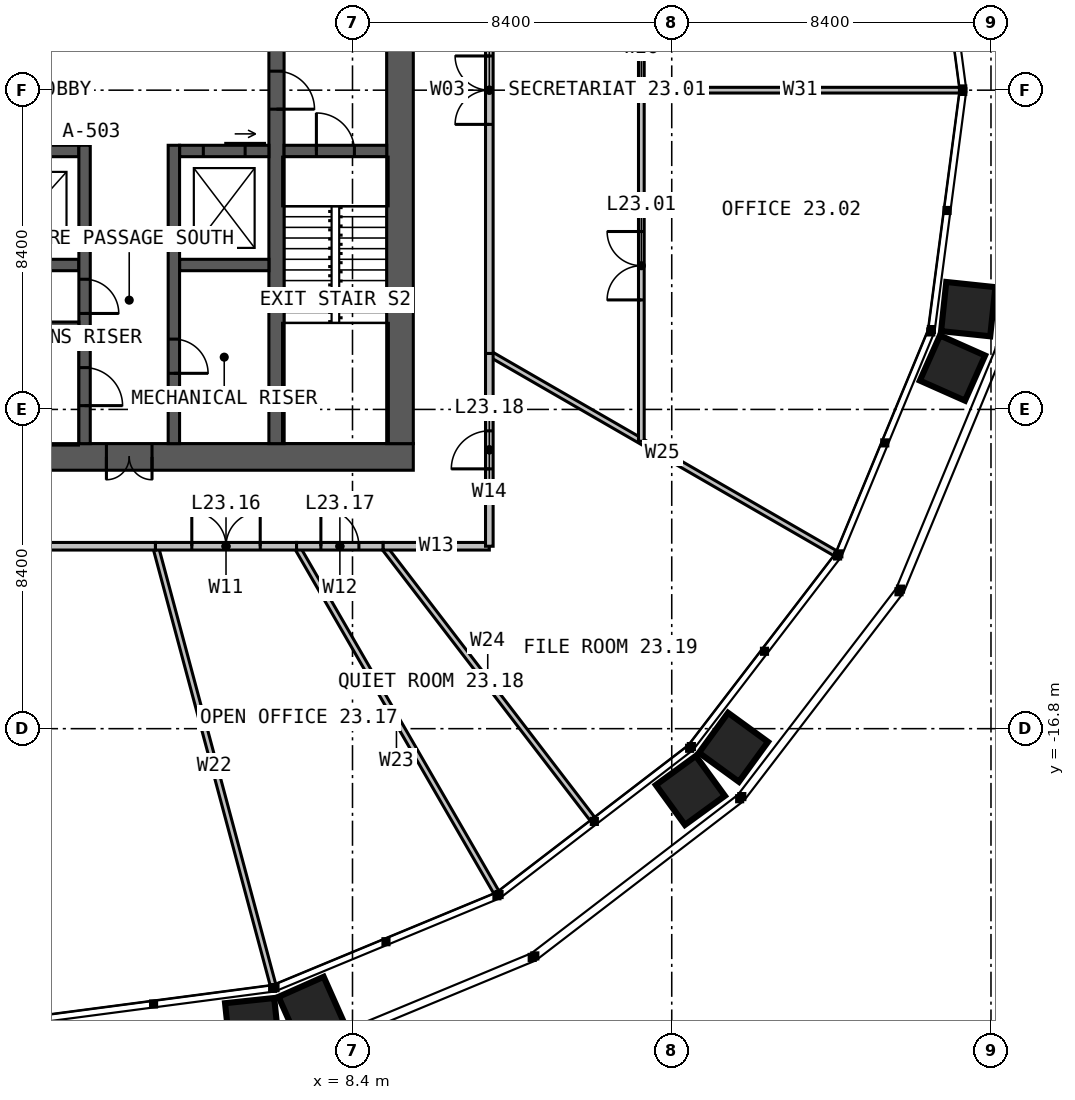
"""IFC4 building model, lengths in metres.
Left out: names, types, materials, properties, quantities, classifications, styles, units other than length and angle.
Written with IfcOpenShell. Run it as: python <this file> out.ifc"""

import sys

from ifc_helpers import new_model, si_unit, direction, frame, frame_2d, origin, place, context, subcontext, project, spatial, rectangle, extrude, element, fill, save


model = new_model("IFC4")
c1 = context("Model", 3, precision=1e-05, world=origin(), true_north=direction((0.0, 1.0)))
c2 = subcontext(c1, "Body", "Model", "MODEL_VIEW")
j1 = project(units=[si_unit("LENGTHUNIT", "METRE"), si_unit("PLANEANGLEUNIT", "RADIAN")], contexts=[c1])
p1 = place(None, origin())
s1 = spatial("IfcSite", under=j1, at=p1, CompositionType="ELEMENT")
p2 = place(p1, origin())
s2 = spatial("IfcBuilding", under=s1, at=p2, CompositionType="ELEMENT")
p3 = place(p2, frame((0.0, 0.0, 98.0)))
s3 = spatial("IfcBuildingStorey", under=s2, at=p3, CompositionType="ELEMENT", Elevation=98.0)
p4 = place(p3, frame((10.0, -9.65, 0.0), z_axis=(0.0, 0.0, 1.0), x_axis=(-1.0, 0.0, 0.0)))
e1 = element("IfcWall", 1, at=p4, inside=s3, PredefinedType="SOLIDWALL", context=c2, shape_type="SweptSolid", body=[
    extrude(rectangle(XDim=20.0, YDim=0.7, at=frame_2d((10.0, 0.0))), origin(), (0.0, 0.0, 1.0), 4.0),
])
p5 = place(p4, frame((6.875, 0.0, 0.0)))
e2 = element("IfcOpeningElement", 2, at=p5, cuts=e1, PredefinedType="OPENING", context=c2, shape_type="SweptSolid", body=[
    extrude(rectangle(XDim=1.2, YDim=2.2, at=frame_2d((0.6, 1.1))), frame((0.0, 0.36, 0.0), z_axis=(0.0, -1.0, 0.0), x_axis=(1.0, 0.0, 0.0)), (0.0, 0.0, 1.0), 0.72),
])
p6 = place(p3, frame((9.65, -9.3, 0.0), z_axis=(0.0, 0.0, 1.0), x_axis=(0.0, 1.0, 0.0)))
e3 = element("IfcWall", 3, at=p6, inside=s3, PredefinedType="SOLIDWALL", context=c2, shape_type="SweptSolid", body=[
    extrude(rectangle(XDim=18.6, YDim=0.7, at=frame_2d((9.3, 0.0))), origin(), (0.0, 0.0, 1.0), 4.0),
])
p7 = place(p3, frame((6.4, 9.3, 0.0), z_axis=(0.0, 0.0, 1.0), x_axis=(0.0, -1.0, 0.0)))
e4 = element("IfcWall", 4, at=p7, inside=s3, PredefinedType="SOLIDWALL", context=c2, shape_type="SweptSolid", body=[
    extrude(rectangle(XDim=18.6, YDim=0.4, at=frame_2d((9.3, 0.0))), origin(), (0.0, 0.0, 1.0), 4.0),
])
p8 = place(p7, frame((8.8, 0.0, 0.0)))
e5 = element("IfcOpeningElement", 5, at=p8, cuts=e4, PredefinedType="OPENING", context=c2, shape_type="SweptSolid", body=[
    extrude(rectangle(XDim=1.0, YDim=2.2, at=frame_2d((0.5, 1.1))), frame((0.0, 0.21, 0.0), z_axis=(0.0, -1.0, 0.0), x_axis=(1.0, 0.0, 0.0)), (0.0, 0.0, 1.0), 0.42),
])
p9 = place(p3, frame((-6.2, -1.6, 0.0), z_axis=(0.0, 0.0, 1.0), x_axis=(1.0, 0.0, 0.0)))
e6 = element("IfcWall", 6, at=p9, inside=s3, PredefinedType="SOLIDWALL", context=c2, shape_type="SweptSolid", body=[
    extrude(rectangle(XDim=7.4, YDim=0.3, at=frame_2d((3.7, 0.0))), origin(), (0.0, 0.0, 1.0), 4.0),
])
p10 = place(p3, frame((3.85, -1.6, 0.0), z_axis=(0.0, 0.0, 1.0), x_axis=(1.0, 0.0, 0.0)))
e7 = element("IfcWall", 7, at=p10, inside=s3, PredefinedType="SOLIDWALL", context=c2, shape_type="SweptSolid", body=[
    extrude(rectangle(XDim=2.35, YDim=0.3, at=frame_2d((1.175, 0.0))), origin(), (0.0, 0.0, 1.0), 4.0),
])
p11 = place(p10, frame((0.625, 0.0, 0.0)))
e8 = element("IfcOpeningElement", 8, at=p11, cuts=e7, PredefinedType="OPENING", context=c2, shape_type="SweptSolid", body=[
    extrude(rectangle(XDim=1.1, YDim=2.2, at=frame_2d((0.55, 1.1))), frame((0.0, 0.16, 0.0), z_axis=(0.0, -1.0, 0.0), x_axis=(1.0, 0.0, 0.0)), (0.0, 0.0, 1.0), 0.32),
])
p12 = place(p3, frame((-6.2, -4.6, 0.0), z_axis=(0.0, 0.0, 1.0), x_axis=(1.0, 0.0, 0.0)))
e9 = element("IfcWall", 9, at=p12, inside=s3, PredefinedType="SOLIDWALL", context=c2, shape_type="SweptSolid", body=[
    extrude(rectangle(XDim=7.4, YDim=0.3, at=frame_2d((3.7, 0.0))), origin(), (0.0, 0.0, 1.0), 4.0),
])
p13 = place(p3, frame((3.85, -4.6, 0.0), z_axis=(0.0, 0.0, 1.0), x_axis=(1.0, 0.0, 0.0)))
e10 = element("IfcWall", 10, at=p13, inside=s3, PredefinedType="SOLIDWALL", context=c2, shape_type="SweptSolid", body=[
    extrude(rectangle(XDim=2.35, YDim=0.3, at=frame_2d((1.175, 0.0))), origin(), (0.0, 0.0, 1.0), 4.0),
])
p14 = place(p3, frame((1.35, -1.45, 0.0), z_axis=(0.0, 0.0, 1.0), x_axis=(0.0, -1.0, 0.0)))
e11 = element("IfcWall", 11, at=p14, inside=s3, PredefinedType="SOLIDWALL", context=c2, shape_type="SweptSolid", body=[
    extrude(rectangle(XDim=7.85, YDim=0.3, at=frame_2d((3.925, 0.0))), origin(), (0.0, 0.0, 1.0), 4.0),
])
p15 = place(p14, frame((5.85, 0.0, 0.0)))
e12 = element("IfcOpeningElement", 12, at=p15, cuts=e11, PredefinedType="OPENING", context=c2, shape_type="SweptSolid", body=[
    extrude(rectangle(XDim=1.0, YDim=2.2, at=frame_2d((0.5, 1.1))), frame((0.0, 0.16, 0.0), z_axis=(0.0, -1.0, 0.0), x_axis=(1.0, 0.0, 0.0)), (0.0, 0.0, 1.0), 0.32),
])
p16 = place(p14, frame((3.525, 0.0, 0.0)))
e13 = element("IfcOpeningElement", 13, at=p16, cuts=e11, PredefinedType="OPENING", context=c2, shape_type="SweptSolid", body=[
    extrude(rectangle(XDim=0.9, YDim=2.2, at=frame_2d((0.45, 1.1))), frame((0.0, 0.16, 0.0), z_axis=(0.0, -1.0, 0.0), x_axis=(1.0, 0.0, 0.0)), (0.0, 0.0, 1.0), 0.32),
])
p17 = place(p3, frame((3.7, -1.45, 0.0), z_axis=(0.0, 0.0, 1.0), x_axis=(0.0, -1.0, 0.0)))
e14 = element("IfcWall", 14, at=p17, inside=s3, PredefinedType="SOLIDWALL", context=c2, shape_type="SweptSolid", body=[
    extrude(rectangle(XDim=7.85, YDim=0.3, at=frame_2d((3.925, 0.0))), origin(), (0.0, 0.0, 1.0), 4.0),
])
p18 = place(p17, frame((5.1, 0.0, 0.0)))
e15 = element("IfcOpeningElement", 15, at=p18, cuts=e14, PredefinedType="OPENING", context=c2, shape_type="SweptSolid", body=[
    extrude(rectangle(XDim=0.9, YDim=2.2, at=frame_2d((0.45, 1.1))), frame((0.0, 0.16, 0.0), z_axis=(0.0, -1.0, 0.0), x_axis=(1.0, 0.0, 0.0)), (0.0, 0.0, 1.0), 0.32),
])
p19 = place(p3, frame((-6.2, -6.2, 0.0), z_axis=(0.0, 0.0, 1.0), x_axis=(1.0, 0.0, 0.0)))
e16 = element("IfcWall", 16, at=p19, inside=s3, PredefinedType="SOLIDWALL", context=c2, shape_type="SweptSolid", body=[
    extrude(rectangle(XDim=7.4, YDim=0.2, at=frame_2d((3.7, 0.0))), origin(), (0.0, 0.0, 1.0), 4.0),
])
p20 = place(p3, frame((6.6, -1.6, 0.0), z_axis=(0.0, 0.0, 1.0), x_axis=(1.0, 0.0, 0.0)))
e17 = element("IfcWall", 17, at=p20, inside=s3, PredefinedType="SOLIDWALL", context=c2, shape_type="SweptSolid", body=[
    extrude(rectangle(XDim=2.7, YDim=0.3, at=frame_2d((1.35, 0.0))), origin(), (0.0, 0.0, 1.0), 4.0),
])
p21 = place(p20, frame((0.85, 0.0, 0.0)))
e18 = element("IfcOpeningElement", 18, at=p21, cuts=e17, PredefinedType="OPENING", context=c2, shape_type="SweptSolid", body=[
    extrude(rectangle(XDim=1.0, YDim=2.2, at=frame_2d((0.5, 1.1))), frame((0.0, 0.16, 0.0), z_axis=(0.0, -1.0, 0.0), x_axis=(1.0, 0.0, 0.0)), (0.0, 0.0, 1.0), 0.32),
])
p22 = place(p3, frame((12.0, -6.928, 0.0), z_axis=(0.0, 0.0, 1.0), x_axis=(0.866028201971, -0.499995153367, 0.0)))
e19 = element("IfcWall", 19, at=p22, inside=s3, PredefinedType="PARTITIONING", context=c2, shape_type="SweptSolid", body=[
    extrude(rectangle(XDim=10.514, YDim=0.15, at=frame_2d((5.257, 0.0))), origin(), (0.0, 0.0, 1.0), 2.79),
])
p23 = place(p3, frame((3.215, -12.0, 0.0), z_axis=(0.0, 0.0, 1.0), x_axis=(0.258816099716, -0.965926615498, 0.0)))
e20 = element("IfcWall", 20, at=p23, inside=s3, PredefinedType="PARTITIONING", context=c2, shape_type="SweptSolid", body=[
    extrude(rectangle(XDim=11.947, YDim=0.15, at=frame_2d((5.973, 0.0))), origin(), (0.0, 0.0, 1.0), 2.79),
])
p24 = place(p3, frame((6.928, -12.0, 0.0), z_axis=(0.0, 0.0, 1.0), x_axis=(0.499995153367, -0.866028201971, 0.0)))
e21 = element("IfcWall", 21, at=p24, inside=s3, PredefinedType="PARTITIONING", context=c2, shape_type="SweptSolid", body=[
    extrude(rectangle(XDim=10.514, YDim=0.15, at=frame_2d((5.257, 0.0))), origin(), (0.0, 0.0, 1.0), 2.79),
])
p25 = place(p3, frame((9.208, -12.0, 0.0), z_axis=(0.0, 0.0, 1.0), x_axis=(0.60876104896, -0.793353631913, 0.0)))
e22 = element("IfcWall", 22, at=p25, inside=s3, PredefinedType="PARTITIONING", context=c2, shape_type="SweptSolid", body=[
    extrude(rectangle(XDim=9.036, YDim=0.15, at=frame_2d((4.518, 0.0))), origin(), (0.0, 0.0, 1.0), 2.79),
])
p26 = place(p3, frame((16.0, -9.238, 0.0), z_axis=(0.0, 0.0, 1.0), x_axis=(0.0, 1.0, 0.0)))
e23 = element("IfcWall", 23, at=p26, inside=s3, PredefinedType="PARTITIONING", context=c2, shape_type="SweptSolid", body=[
    extrude(rectangle(XDim=18.475, YDim=0.15, at=frame_2d((9.238, 0.0))), origin(), (0.0, 0.0, 1.0), 2.79),
])
p27 = place(p26, frame((3.719, 0.0, 0.0)))
e24 = element("IfcOpeningElement", 24, at=p27, cuts=e23, PredefinedType="OPENING", context=c2, shape_type="SweptSolid", body=[
    extrude(rectangle(XDim=1.8, YDim=2.2, at=frame_2d((0.9, 1.1))), frame((0.0, 0.085, 0.0), z_axis=(0.0, -1.0, 0.0), x_axis=(1.0, 0.0, 0.0)), (0.0, 0.0, 1.0), 0.17),
])
p28 = place(p26, frame((12.051, 0.0, 0.0)))
e25 = element("IfcOpeningElement", 25, at=p28, cuts=e23, PredefinedType="OPENING", context=c2, shape_type="SweptSolid", body=[
    extrude(rectangle(XDim=1.0, YDim=2.2, at=frame_2d((0.5, 1.1))), frame((0.0, 0.085, 0.0), z_axis=(0.0, -1.0, 0.0), x_axis=(1.0, 0.0, 0.0)), (0.0, 0.0, 1.0), 0.17),
])
p29 = place(p26, frame((16.67, 0.0, 0.0)))
e26 = element("IfcOpeningElement", 26, at=p29, cuts=e23, PredefinedType="OPENING", context=c2, shape_type="SweptSolid", body=[
    extrude(rectangle(XDim=1.0, YDim=2.2, at=frame_2d((0.5, 1.1))), frame((0.0, 0.085, 0.0), z_axis=(0.0, -1.0, 0.0), x_axis=(1.0, 0.0, 0.0)), (0.0, 0.0, 1.0), 0.17),
])
p30 = place(p3, frame((16.0, 0.0, 0.0), z_axis=(0.0, 0.0, 1.0), x_axis=(1.0, 0.0, 0.0)))
e27 = element("IfcWall", 27, at=p30, inside=s3, PredefinedType="PARTITIONING", context=c2, shape_type="SweptSolid", body=[
    extrude(rectangle(XDim=8.37, YDim=0.15, at=frame_2d((4.185, 0.0))), origin(), (0.0, 0.0, 1.0), 2.79),
])
p31 = place(p3, frame((12.0, -6.928, 0.0), z_axis=(0.0, 0.0, 1.0), x_axis=(0.0, 1.0, 0.0)))
e28 = element("IfcWall", 28, at=p31, inside=s3, PredefinedType="PARTITIONING", context=c2, shape_type="SweptSolid", body=[
    extrude(rectangle(XDim=13.856, YDim=0.2, at=frame_2d((6.928, 0.0))), origin(), (0.0, 0.0, 1.0), 3.8),
])
p32 = place(p31, frame((6.028, 0.0, 0.0)))
e29 = element("IfcOpeningElement", 29, at=p32, cuts=e28, PredefinedType="OPENING", context=c2, shape_type="SweptSolid", body=[
    extrude(rectangle(XDim=1.8, YDim=2.2, at=frame_2d((0.9, 1.1))), frame((0.0, 0.11, 0.0), z_axis=(0.0, -1.0, 0.0), x_axis=(1.0, 0.0, 0.0)), (0.0, 0.0, 1.0), 0.22),
])
p33 = place(p3, frame((-6.928, -12.0, 0.0), z_axis=(0.0, 0.0, 1.0), x_axis=(1.0, 0.0, 0.0)))
e30 = element("IfcWall", 30, at=p33, inside=s3, PredefinedType="PARTITIONING", context=c2, shape_type="SweptSolid", body=[
    extrude(rectangle(XDim=10.144, YDim=0.2, at=frame_2d((5.072, 0.0))), origin(), (0.0, 0.0, 1.0), 3.8),
])
p34 = place(p33, frame((4.172, 0.0, 0.0)))
e31 = element("IfcOpeningElement", 31, at=p34, cuts=e30, PredefinedType="OPENING", context=c2, shape_type="SweptSolid", body=[
    extrude(rectangle(XDim=1.8, YDim=2.2, at=frame_2d((0.9, 1.1))), frame((0.0, 0.11, 0.0), z_axis=(0.0, -1.0, 0.0), x_axis=(1.0, 0.0, 0.0)), (0.0, 0.0, 1.0), 0.22),
])
p35 = place(p3, frame((3.215, -12.0, 0.0), z_axis=(0.0, 0.0, 1.0), x_axis=(1.0, 0.0, 0.0)))
e32 = element("IfcWall", 32, at=p35, inside=s3, PredefinedType="PARTITIONING", context=c2, shape_type="SweptSolid", body=[
    extrude(rectangle(XDim=3.713, YDim=0.2, at=frame_2d((1.856, 0.0))), origin(), (0.0, 0.0, 1.0), 3.8),
])
p36 = place(p35, frame((0.956, 0.0, 0.0)))
e33 = element("IfcOpeningElement", 33, at=p36, cuts=e32, PredefinedType="OPENING", context=c2, shape_type="SweptSolid", body=[
    extrude(rectangle(XDim=1.8, YDim=2.2, at=frame_2d((0.9, 1.1))), frame((0.0, 0.11, 0.0), z_axis=(0.0, -1.0, 0.0), x_axis=(1.0, 0.0, 0.0)), (0.0, 0.0, 1.0), 0.22),
])
p37 = place(p3, frame((6.928, -12.0, 0.0), z_axis=(0.0, 0.0, 1.0), x_axis=(1.0, 0.0, 0.0)))
e34 = element("IfcWall", 34, at=p37, inside=s3, PredefinedType="PARTITIONING", context=c2, shape_type="SweptSolid", body=[
    extrude(rectangle(XDim=2.28, YDim=0.2, at=frame_2d((1.14, 0.0))), origin(), (0.0, 0.0, 1.0), 3.8),
])
p38 = place(p37, frame((0.64, 0.0, 0.0)))
e35 = element("IfcOpeningElement", 35, at=p38, cuts=e34, PredefinedType="OPENING", context=c2, shape_type="SweptSolid", body=[
    extrude(rectangle(XDim=1.0, YDim=2.2, at=frame_2d((0.5, 1.1))), frame((0.0, 0.11, 0.0), z_axis=(0.0, -1.0, 0.0), x_axis=(1.0, 0.0, 0.0)), (0.0, 0.0, 1.0), 0.22),
])
p39 = place(p3, frame((9.208, -12.0, 0.0), z_axis=(0.0, 0.0, 1.0), x_axis=(1.0, 0.0, 0.0)))
e36 = element("IfcWall", 36, at=p39, inside=s3, PredefinedType="PARTITIONING", context=c2, shape_type="SweptSolid", body=[
    extrude(rectangle(XDim=2.792, YDim=0.2, at=frame_2d((1.396, 0.0))), origin(), (0.0, 0.0, 1.0), 3.8),
])
p40 = place(p3, frame((12.0, -12.0, 0.0), z_axis=(0.0, 0.0, 1.0), x_axis=(0.0, 1.0, 0.0)))
e37 = element("IfcWall", 37, at=p40, inside=s3, PredefinedType="PARTITIONING", context=c2, shape_type="SweptSolid", body=[
    extrude(rectangle(XDim=5.072, YDim=0.2, at=frame_2d((2.536, 0.0))), origin(), (0.0, 0.0, 1.0), 3.8),
])
p41 = place(p40, frame((2.036, 0.0, 0.0)))
e38 = element("IfcOpeningElement", 38, at=p41, cuts=e37, PredefinedType="OPENING", context=c2, shape_type="SweptSolid", body=[
    extrude(rectangle(XDim=1.0, YDim=2.2, at=frame_2d((0.5, 1.1))), frame((0.0, 0.11, 0.0), z_axis=(0.0, -1.0, 0.0), x_axis=(1.0, 0.0, 0.0)), (0.0, 0.0, 1.0), 0.22),
])
p42 = place(p5, origin())
e39 = element("IfcDoor", 39, at=p42, inside=s3, OperationType="DOUBLE_DOOR_SINGLE_SWING", PredefinedType="DOOR", context=c2, shape_type="SweptSolid", body=[
    extrude(rectangle(XDim=1.2, YDim=2.2, at=frame_2d((0.6, 1.1))), frame((0.0, 0.025, 0.0), z_axis=(0.0, -1.0, 0.0), x_axis=(1.0, 0.0, 0.0)), (0.0, 0.0, 1.0), 0.05),
])
fill(e2, e39)
p43 = place(p8, origin())
e40 = element("IfcDoor", 40, at=p43, inside=s3, OperationType="SINGLE_SWING_RIGHT", PredefinedType="DOOR", context=c2, shape_type="SweptSolid", body=[
    extrude(rectangle(XDim=1.0, YDim=2.2, at=frame_2d((0.5, 1.1))), frame((0.0, 0.025, 0.0), z_axis=(0.0, -1.0, 0.0), x_axis=(1.0, 0.0, 0.0)), (0.0, 0.0, 1.0), 0.05),
])
fill(e5, e40)
p44 = place(p21, origin())
e41 = element("IfcDoor", 41, at=p44, inside=s3, OperationType="SINGLE_SWING_LEFT", PredefinedType="DOOR", context=c2, shape_type="SweptSolid", body=[
    extrude(rectangle(XDim=1.0, YDim=2.2, at=frame_2d((0.5, 1.1))), frame((0.0, 0.025, 0.0), z_axis=(0.0, -1.0, 0.0), x_axis=(1.0, 0.0, 0.0)), (0.0, 0.0, 1.0), 0.05),
])
fill(e18, e41)
p45 = place(p15, origin())
e42 = element("IfcDoor", 42, at=p45, inside=s3, OperationType="SINGLE_SWING_RIGHT", PredefinedType="DOOR", context=c2, shape_type="SweptSolid", body=[
    extrude(rectangle(XDim=1.0, YDim=2.2, at=frame_2d((0.5, 1.1))), frame((0.0, 0.025, 0.0), z_axis=(0.0, -1.0, 0.0), x_axis=(1.0, 0.0, 0.0)), (0.0, 0.0, 1.0), 0.05),
])
fill(e12, e42)
p46 = place(p16, origin())
e43 = element("IfcDoor", 43, at=p46, inside=s3, OperationType="SINGLE_SWING_RIGHT", PredefinedType="DOOR", context=c2, shape_type="SweptSolid", body=[
    extrude(rectangle(XDim=0.9, YDim=2.2, at=frame_2d((0.45, 1.1))), frame((0.0, 0.025, 0.0), z_axis=(0.0, -1.0, 0.0), x_axis=(1.0, 0.0, 0.0)), (0.0, 0.0, 1.0), 0.05),
])
fill(e13, e43)
p47 = place(p18, origin())
e44 = element("IfcDoor", 44, at=p47, inside=s3, OperationType="SINGLE_SWING_RIGHT", PredefinedType="DOOR", context=c2, shape_type="SweptSolid", body=[
    extrude(rectangle(XDim=0.9, YDim=2.2, at=frame_2d((0.45, 1.1))), frame((0.0, 0.025, 0.0), z_axis=(0.0, -1.0, 0.0), x_axis=(1.0, 0.0, 0.0)), (0.0, 0.0, 1.0), 0.05),
])
fill(e15, e44)
p48 = place(p11, origin())
e45 = element("IfcDoor", 45, at=p48, inside=s3, OperationType="SLIDING_TO_LEFT", PredefinedType="DOOR", context=c2, shape_type="SweptSolid", body=[
    extrude(rectangle(XDim=1.1, YDim=2.2, at=frame_2d((0.55, 1.1))), frame((0.0, 0.025, 0.0), z_axis=(0.0, -1.0, 0.0), x_axis=(1.0, 0.0, 0.0)), (0.0, 0.0, 1.0), 0.05),
])
fill(e8, e45)
p49 = place(p27, origin())
e46 = element("IfcDoor", 46, at=p49, inside=s3, OperationType="DOUBLE_DOOR_SINGLE_SWING", PredefinedType="DOOR", context=c2, shape_type="SweptSolid", body=[
    extrude(rectangle(XDim=1.8, YDim=2.2, at=frame_2d((0.9, 1.1))), frame((0.0, 0.025, 0.0), z_axis=(0.0, -1.0, 0.0), x_axis=(1.0, 0.0, 0.0)), (0.0, 0.0, 1.0), 0.05),
])
fill(e24, e46)
p50 = place(p32, origin())
e47 = element("IfcDoor", 47, at=p50, inside=s3, OperationType="DOUBLE_DOOR_SINGLE_SWING", PredefinedType="DOOR", context=c2, shape_type="SweptSolid", body=[
    extrude(rectangle(XDim=1.8, YDim=2.2, at=frame_2d((0.9, 1.1))), frame((0.0, 0.025, 0.0), z_axis=(0.0, -1.0, 0.0), x_axis=(1.0, 0.0, 0.0)), (0.0, 0.0, 1.0), 0.05),
])
fill(e29, e47)
p51 = place(p36, origin())
e48 = element("IfcDoor", 48, at=p51, inside=s3, OperationType="DOUBLE_DOOR_SINGLE_SWING", PredefinedType="DOOR", context=c2, shape_type="SweptSolid", body=[
    extrude(rectangle(XDim=1.8, YDim=2.2, at=frame_2d((0.9, 1.1))), frame((0.0, 0.025, 0.0), z_axis=(0.0, -1.0, 0.0), x_axis=(1.0, 0.0, 0.0)), (0.0, 0.0, 1.0), 0.05),
])
fill(e33, e48)
p52 = place(p38, origin())
e49 = element("IfcDoor", 49, at=p52, inside=s3, OperationType="SINGLE_SWING_LEFT", PredefinedType="DOOR", context=c2, shape_type="SweptSolid", body=[
    extrude(rectangle(XDim=1.0, YDim=2.2, at=frame_2d((0.5, 1.1))), frame((0.0, 0.025, 0.0), z_axis=(0.0, -1.0, 0.0), x_axis=(1.0, 0.0, 0.0)), (0.0, 0.0, 1.0), 0.05),
])
fill(e35, e49)
p53 = place(p41, origin())
e50 = element("IfcDoor", 50, at=p53, inside=s3, OperationType="SINGLE_SWING_LEFT", PredefinedType="DOOR", context=c2, shape_type="SweptSolid", body=[
    extrude(rectangle(XDim=1.0, YDim=2.2, at=frame_2d((0.5, 1.1))), frame((0.0, 0.025, 0.0), z_axis=(0.0, -1.0, 0.0), x_axis=(1.0, 0.0, 0.0)), (0.0, 0.0, 1.0), 0.05),
])
fill(e38, e50)
save(model, sys.argv[1])
